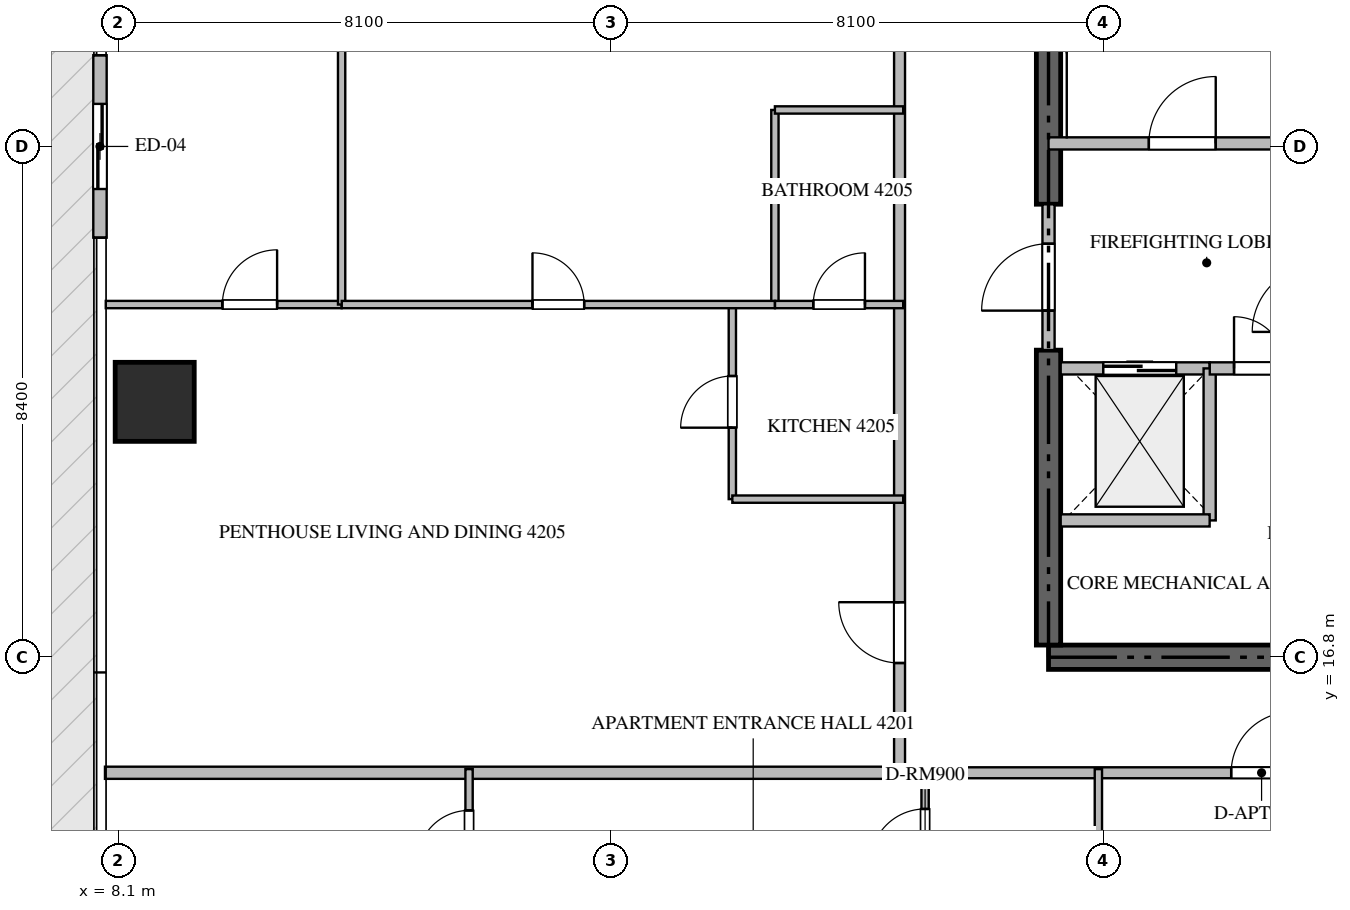
"""IFC4 building model, lengths in metres.
Left out: names, types, materials, properties, quantities, classifications, styles, units other than length and angle.
Written with IfcOpenShell. Run it as: python <this file> out.ifc"""

import sys

from ifc_helpers import new_model, si_unit, direction, frame, frame_2d, origin, origin_2d, place, context, subcontext, project, spatial, rectangle, extrude, source, transform, mapped, element, fill, save


model = new_model("IFC4")
c1 = context("Model", 3, precision=1e-05, world=origin(), true_north=direction((0.0, 1.0)))
c2 = subcontext(c1, "Body", "Model", "MODEL_VIEW")
j1 = project(units=[si_unit("LENGTHUNIT", "METRE"), si_unit("PLANEANGLEUNIT", "RADIAN")], contexts=[c1])
p1 = place(None, origin())
s1 = spatial("IfcSite", under=j1, at=p1, CompositionType="ELEMENT")
p2 = place(p1, origin())
s2 = spatial("IfcBuilding", under=s1, at=p2, CompositionType="ELEMENT")
p3 = place(p2, frame((0.0, 0.0, 168.9)))
s3 = spatial("IfcBuildingStorey", under=s2, at=p3, CompositionType="ELEMENT", Elevation=168.9)
p4 = place(p3, frame((23.4, 16.8, -0.26), z_axis=(0.0, 0.0, 1.0), x_axis=(1.0, 0.0, 0.0)))
e1 = element("IfcWall", 1, at=p4, inside=s3, PredefinedType="SHEAR", context=c2, shape_type="SweptSolid", body=[
    extrude(rectangle(XDim=18.0, YDim=0.4, at=frame_2d((9.0, 0.0))), origin(), (0.0, 0.0, 1.0), 3.748),
])
p5 = place(p3, frame((23.4, 17.0, -0.26), z_axis=(0.0, 0.0, 1.0), x_axis=(0.0, 1.0, 0.0)))
e2 = element("IfcWall", 2, at=p5, inside=s3, PredefinedType="SHEAR", context=c2, shape_type="SweptSolid", body=[
    extrude(rectangle(XDim=4.85, YDim=0.4, at=frame_2d((2.425, 0.0))), origin(), (0.0, 0.0, 1.0), 3.748),
])
p6 = place(p3, frame((23.4, 24.25, -0.26), z_axis=(0.0, 0.0, 1.0), x_axis=(0.0, 1.0, 0.0)))
e3 = element("IfcWall", 3, at=p6, inside=s3, PredefinedType="SHEAR", context=c2, shape_type="SweptSolid", body=[
    extrude(rectangle(XDim=9.15, YDim=0.4, at=frame_2d((4.575, 0.0))), origin(), (0.0, 0.0, 1.0), 3.748),
])
m1 = source(origin(), c2, "Body", "SweptSolid", [
    extrude(rectangle(XDim=1.3, YDim=1.3, at=origin_2d()), origin(), (0.0, 0.0, 1.0), 3.75),
])
p7 = place(p3, frame((8.7, 21.0, -0.26), z_axis=(0.0, 0.0, 1.0), x_axis=(1.0, 0.0, 0.0)))
e4 = element("IfcColumn", 4, at=p7, inside=s3, PredefinedType="COLUMN", context=c2, shape_type="MappedRepresentation", body=[
    mapped(m1, transform((0.0, 0.0, 0.0), scale=1.0)),
])
p8 = place(p3, frame((7.8, 26.7, 0.0), z_axis=(0.0, 0.0, 1.0), x_axis=(0.0, -1.0, 0.0)))
e5 = element("IfcWall", 5, at=p8, inside=s3, PredefinedType="ELEMENTEDWALL", context=c2, shape_type="SweptSolid", body=[
    extrude(rectangle(XDim=3.0, YDim=0.22, at=frame_2d((1.5, 0.0))), origin(), (0.0, 0.0, 1.0), 3.475),
])
p9 = place(p8, frame((0.8, 0.0, 0.0)))
e6 = element("IfcOpeningElement", 6, at=p9, cuts=e5, PredefinedType="OPENING", context=c2, shape_type="SweptSolid", body=[
    extrude(rectangle(XDim=1.4, YDim=2.25, at=frame_2d((0.7, 1.125))), frame((0.0, 0.12, 0.0), z_axis=(0.0, -1.0, 0.0), x_axis=(1.0, 0.0, 0.0)), (0.0, 0.0, 1.0), 0.24),
])
p10 = place(p3, frame((23.4, 25.25, 0.0), z_axis=(0.0, 0.0, 1.0), x_axis=(1.0, 0.0, 0.0)))
e7 = element("IfcWall", 7, at=p10, inside=s3, PredefinedType="STANDARD", context=c2, shape_type="SweptSolid", body=[
    extrude(rectangle(XDim=4.45, YDim=0.2, at=frame_2d((2.225, 0.0))), origin(), (0.0, 0.0, 1.0), 3.49),
])
p11 = place(p10, frame((1.65, 0.0, 0.0)))
e8 = element("IfcOpeningElement", 8, at=p11, cuts=e7, PredefinedType="OPENING", context=c2, shape_type="SweptSolid", body=[
    extrude(rectangle(XDim=1.1, YDim=2.15, at=frame_2d((0.55, 1.075))), frame((0.0, 0.11, 0.0), z_axis=(0.0, -1.0, 0.0), x_axis=(1.0, 0.0, 0.0)), (0.0, 0.0, 1.0), 0.22),
])
p12 = place(p3, frame((23.6, 21.55, 0.0), z_axis=(0.0, 0.0, 1.0), x_axis=(1.0, 0.0, 0.0)))
e9 = element("IfcWall", 9, at=p12, inside=s3, PredefinedType="STANDARD", context=c2, shape_type="SweptSolid", body=[
    extrude(rectangle(XDim=2.45, YDim=0.2, at=frame_2d((1.225, 0.0))), origin(), (0.0, 0.0, 1.0), 3.49),
])
p13 = place(p12, frame((0.7, 0.0, 0.0)))
e10 = element("IfcOpeningElement", 10, at=p13, cuts=e9, PredefinedType="OPENING", context=c2, shape_type="SweptSolid", body=[
    extrude(rectangle(XDim=1.2, YDim=2.2, at=frame_2d((0.6, 1.1))), frame((0.0, 0.11, 0.0), z_axis=(0.0, -1.0, 0.0), x_axis=(1.0, 0.0, 0.0)), (0.0, 0.0, 1.0), 0.22),
])
p14 = place(p3, frame((26.05, 19.05, 0.0), z_axis=(0.0, 0.0, 1.0), x_axis=(0.0, 1.0, 0.0)))
e11 = element("IfcWall", 11, at=p14, inside=s3, PredefinedType="STANDARD", context=c2, shape_type="SweptSolid", body=[
    extrude(rectangle(XDim=2.5, YDim=0.2, at=frame_2d((1.25, 0.0))), origin(), (0.0, 0.0, 1.0), 3.49),
])
p15 = place(p3, frame((23.6, 19.05, 0.0), z_axis=(0.0, 0.0, 1.0), x_axis=(1.0, 0.0, 0.0)))
e12 = element("IfcWall", 12, at=p15, inside=s3, PredefinedType="STANDARD", context=c2, shape_type="SweptSolid", body=[
    extrude(rectangle(XDim=2.45, YDim=0.2, at=frame_2d((1.225, 0.0))), origin(), (0.0, 0.0, 1.0), 3.49),
])
p16 = place(p3, frame((26.052, 21.55, 0.0), z_axis=(0.0, 0.0, 1.0), x_axis=(1.0, 0.0, 0.0)))
e13 = element("IfcWall", 13, at=p16, inside=s3, PredefinedType="STANDARD", context=c2, shape_type="SweptSolid", body=[
    extrude(rectangle(XDim=1.648, YDim=0.2, at=frame_2d((0.824, 0.0))), origin(), (0.0, 0.0, 1.0), 3.49),
])
p17 = place(p16, frame((0.399, 0.0, 0.0)))
e14 = element("IfcOpeningElement", 14, at=p17, cuts=e13, PredefinedType="OPENING", context=c2, shape_type="SweptSolid", body=[
    extrude(rectangle(XDim=0.85, YDim=2.1, at=frame_2d((0.425, 1.05))), frame((0.0, 0.11, 0.0), z_axis=(0.0, -1.0, 0.0), x_axis=(1.0, 0.0, 0.0)), (0.0, 0.0, 1.0), 0.22),
])
p18 = place(p3, frame((23.4, 21.852, 0.0), z_axis=(0.0, 0.0, 1.0), x_axis=(0.0, 1.0, 0.0)))
e15 = element("IfcWall", 15, at=p18, inside=s3, PredefinedType="STANDARD", context=c2, shape_type="SweptSolid", body=[
    extrude(rectangle(XDim=2.396, YDim=0.2, at=frame_2d((1.198, 0.0))), origin(), (0.0, 0.0, 1.0), 3.49),
])
p19 = place(p18, frame((0.648, 0.0, 0.0)))
e16 = element("IfcOpeningElement", 16, at=p19, cuts=e15, PredefinedType="OPENING", context=c2, shape_type="SweptSolid", body=[
    extrude(rectangle(XDim=1.1, YDim=2.15, at=frame_2d((0.55, 1.075))), frame((0.0, 0.11, 0.0), z_axis=(0.0, -1.0, 0.0), x_axis=(1.0, 0.0, 0.0)), (0.0, 0.0, 1.0), 0.22),
])
p20 = place(p3, frame((7.882, 14.9, 0.0), z_axis=(0.0, 0.0, 1.0), x_axis=(1.0, 0.0, 0.0)))
e17 = element("IfcWall", 17, at=p20, inside=s3, PredefinedType="PARTITIONING", context=c2, shape_type="SweptSolid", body=[
    extrude(rectangle(XDim=13.068, YDim=0.2, at=frame_2d((6.534, 0.0))), origin(), (0.0, 0.0, 1.0), 3.49),
])
p21 = place(p3, frame((20.952, 14.9, 0.0), z_axis=(0.0, 0.0, 1.0), x_axis=(1.0, 0.0, 0.0)))
e18 = element("IfcWall", 18, at=p21, inside=s3, PredefinedType="PARTITIONING", context=c2, shape_type="SweptSolid", body=[
    extrude(rectangle(XDim=22.896, YDim=0.18, at=frame_2d((11.448, 0.0))), origin(), (0.0, 0.0, 1.0), 3.49),
])
p22 = place(p21, frame((5.452, 0.0, 0.0)))
e19 = element("IfcOpeningElement", 19, at=p22, cuts=e18, PredefinedType="OPENING", context=c2, shape_type="SweptSolid", body=[
    extrude(rectangle(XDim=1.0, YDim=2.15, at=frame_2d((0.5, 1.075))), frame((0.0, 0.1, 0.0), z_axis=(0.0, -1.0, 0.0), x_axis=(1.0, 0.0, 0.0)), (0.0, 0.0, 1.0), 0.2),
])
p23 = place(p21, frame((19.378, 0.0, 0.0)))
e20 = element("IfcOpeningElement", 20, at=p23, cuts=e18, PredefinedType="OPENING", context=c2, shape_type="SweptSolid", body=[
    extrude(rectangle(XDim=1.0, YDim=2.15, at=frame_2d((0.5, 1.075))), frame((0.0, 0.1, 0.0), z_axis=(0.0, -1.0, 0.0), x_axis=(1.0, 0.0, 0.0)), (0.0, 0.0, 1.0), 0.2),
])
p24 = place(p3, frame((20.95, 14.9, 0.0), z_axis=(0.0, 0.0, 1.0), x_axis=(0.0, 1.0, 0.0)))
e21 = element("IfcWall", 21, at=p24, inside=s3, PredefinedType="PARTITIONING", context=c2, shape_type="SweptSolid", body=[
    extrude(rectangle(XDim=18.7, YDim=0.18, at=frame_2d((9.35, 0.0))), origin(), (0.0, 0.0, 1.0), 3.49),
])
p25 = place(p24, frame((1.805, 0.0, 0.0)))
e22 = element("IfcOpeningElement", 22, at=p25, cuts=e21, PredefinedType="OPENING", context=c2, shape_type="SweptSolid", body=[
    extrude(rectangle(XDim=1.0, YDim=2.15, at=frame_2d((0.5, 1.075))), frame((0.0, 0.1, 0.0), z_axis=(0.0, -1.0, 0.0), x_axis=(1.0, 0.0, 0.0)), (0.0, 0.0, 1.0), 0.2),
])
p26 = place(p3, frame((24.22, 12.15, 0.0), z_axis=(0.0, 0.0, 1.0), x_axis=(0.0, 1.0, 0.0)))
e23 = element("IfcWall", 23, at=p26, inside=s3, PredefinedType="PARTITIONING", context=c2, shape_type="SweptSolid", body=[
    extrude(rectangle(XDim=2.81, YDim=0.12, at=frame_2d((1.405, 0.0))), origin(), (0.0, 0.0, 1.0), 3.49),
])
p27 = place(p3, frame((21.37, 12.75, 0.0), z_axis=(0.0, 0.0, 1.0), x_axis=(0.0, 1.0, 0.0)))
e24 = element("IfcWall", 24, at=p27, inside=s3, PredefinedType="PARTITIONING", context=c2, shape_type="SweptSolid", body=[
    extrude(rectangle(XDim=2.21, YDim=0.12, at=frame_2d((1.105, 0.0))), origin(), (0.0, 0.0, 1.0), 3.49),
])
p28 = place(p27, frame((0.655, 0.0, 0.0)))
e25 = element("IfcOpeningElement", 25, at=p28, cuts=e24, PredefinedType="OPENING", context=c2, shape_type="SweptSolid", body=[
    extrude(rectangle(XDim=0.9, YDim=2.1, at=frame_2d((0.45, 1.05))), frame((0.0, 0.07, 0.0), z_axis=(0.0, -1.0, 0.0), x_axis=(1.0, 0.0, 0.0)), (0.0, 0.0, 1.0), 0.14),
])
p29 = place(p3, frame((13.87, 12.752, 0.0), z_axis=(0.0, 0.0, 1.0), x_axis=(0.0, 1.0, 0.0)))
e26 = element("IfcWall", 26, at=p29, inside=s3, PredefinedType="PARTITIONING", context=c2, shape_type="SweptSolid", body=[
    extrude(rectangle(XDim=2.208, YDim=0.12, at=frame_2d((1.104, 0.0))), origin(), (0.0, 0.0, 1.0), 3.49),
])
p30 = place(p29, frame((0.679, 0.0, 0.0)))
e27 = element("IfcOpeningElement", 27, at=p30, cuts=e26, PredefinedType="OPENING", context=c2, shape_type="SweptSolid", body=[
    extrude(rectangle(XDim=0.85, YDim=2.1, at=frame_2d((0.425, 1.05))), frame((0.0, 0.07, 0.0), z_axis=(0.0, -1.0, 0.0), x_axis=(1.0, 0.0, 0.0)), (0.0, 0.0, 1.0), 0.14),
])
p31 = place(p3, frame((18.2, 19.4, 0.0), z_axis=(0.0, 0.0, 1.0), x_axis=(0.0, 1.0, 0.0)))
e28 = element("IfcWall", 28, at=p31, inside=s3, PredefinedType="PARTITIONING", context=c2, shape_type="SweptSolid", body=[
    extrude(rectangle(XDim=3.2, YDim=0.12, at=frame_2d((1.6, 0.0))), origin(), (0.0, 0.0, 1.0), 3.49),
])
p32 = place(p31, frame((1.175, 0.0, 0.0)))
e29 = element("IfcOpeningElement", 29, at=p32, cuts=e28, PredefinedType="OPENING", context=c2, shape_type="SweptSolid", body=[
    extrude(rectangle(XDim=0.85, YDim=2.1, at=frame_2d((0.425, 1.05))), frame((0.0, 0.07, 0.0), z_axis=(0.0, -1.0, 0.0), x_axis=(1.0, 0.0, 0.0)), (0.0, 0.0, 1.0), 0.14),
])
p33 = place(p3, frame((18.2, 19.4, 0.0), z_axis=(0.0, 0.0, 1.0), x_axis=(1.0, 0.0, 0.0)))
e30 = element("IfcWall", 30, at=p33, inside=s3, PredefinedType="PARTITIONING", context=c2, shape_type="SweptSolid", body=[
    extrude(rectangle(XDim=2.81, YDim=0.12, at=frame_2d((1.405, 0.0))), origin(), (0.0, 0.0, 1.0), 3.49),
])
p34 = place(p3, frame((7.895, 22.6, 0.0), z_axis=(0.0, 0.0, 1.0), x_axis=(1.0, 0.0, 0.0)))
e31 = element("IfcWall", 31, at=p34, inside=s3, PredefinedType="PARTITIONING", context=c2, shape_type="SweptSolid", body=[
    extrude(rectangle(XDim=3.879, YDim=0.12, at=frame_2d((1.939, 0.0))), origin(), (0.0, 0.0, 1.0), 3.49),
])
p35 = place(p34, frame((1.918, 0.0, 0.0)))
e32 = element("IfcOpeningElement", 32, at=p35, cuts=e31, PredefinedType="OPENING", context=c2, shape_type="SweptSolid", body=[
    extrude(rectangle(XDim=0.9, YDim=2.1, at=frame_2d((0.45, 1.05))), frame((0.0, 0.07, 0.0), z_axis=(0.0, -1.0, 0.0), x_axis=(1.0, 0.0, 0.0)), (0.0, 0.0, 1.0), 0.14),
])
p36 = place(p3, frame((11.774, 22.6, 0.0), z_axis=(0.0, 0.0, 1.0), x_axis=(0.0, 1.0, 0.0)))
e33 = element("IfcWall", 33, at=p36, inside=s3, PredefinedType="PARTITIONING", context=c2, shape_type="SweptSolid", body=[
    extrude(rectangle(XDim=11.06, YDim=0.12, at=frame_2d((5.53, 0.0))), origin(), (0.0, 0.0, 1.0), 3.49),
])
p37 = place(p3, frame((18.9, 22.6, 0.0), z_axis=(0.0, 0.0, 1.0), x_axis=(0.0, 1.0, 0.0)))
e34 = element("IfcWall", 34, at=p37, inside=s3, PredefinedType="PARTITIONING", context=c2, shape_type="SweptSolid", body=[
    extrude(rectangle(XDim=3.2, YDim=0.12, at=frame_2d((1.6, 0.0))), origin(), (0.0, 0.0, 1.0), 3.49),
])
p38 = place(p3, frame((18.9, 25.8, 0.0), z_axis=(0.0, 0.0, 1.0), x_axis=(1.0, 0.0, 0.0)))
e35 = element("IfcWall", 35, at=p38, inside=s3, PredefinedType="PARTITIONING", context=c2, shape_type="SweptSolid", body=[
    extrude(rectangle(XDim=2.11, YDim=0.12, at=frame_2d((1.055, 0.0))), origin(), (0.0, 0.0, 1.0), 3.49),
])
p39 = place(p3, frame((11.776, 22.6, 0.0), z_axis=(0.0, 0.0, 1.0), x_axis=(1.0, 0.0, 0.0)))
e36 = element("IfcWall", 36, at=p39, inside=s3, PredefinedType="PARTITIONING", context=c2, shape_type="SweptSolid", body=[
    extrude(rectangle(XDim=7.124, YDim=0.12, at=frame_2d((3.562, 0.0))), origin(), (0.0, 0.0, 1.0), 3.49),
])
p40 = place(p39, frame((3.137, 0.0, 0.0)))
e37 = element("IfcOpeningElement", 37, at=p40, cuts=e36, PredefinedType="OPENING", context=c2, shape_type="SweptSolid", body=[
    extrude(rectangle(XDim=0.85, YDim=2.1, at=frame_2d((0.425, 1.05))), frame((0.0, 0.07, 0.0), z_axis=(0.0, -1.0, 0.0), x_axis=(1.0, 0.0, 0.0)), (0.0, 0.0, 1.0), 0.14),
])
p41 = place(p3, frame((18.902, 22.6, 0.0), z_axis=(0.0, 0.0, 1.0), x_axis=(1.0, 0.0, 0.0)))
e38 = element("IfcWall", 38, at=p41, inside=s3, PredefinedType="PARTITIONING", context=c2, shape_type="SweptSolid", body=[
    extrude(rectangle(XDim=2.108, YDim=0.12, at=frame_2d((1.054, 0.0))), origin(), (0.0, 0.0, 1.0), 3.49),
])
p42 = place(p41, frame((0.629, 0.0, 0.0)))
e39 = element("IfcOpeningElement", 39, at=p42, cuts=e38, PredefinedType="OPENING", context=c2, shape_type="SweptSolid", body=[
    extrude(rectangle(XDim=0.85, YDim=2.1, at=frame_2d((0.425, 1.05))), frame((0.0, 0.07, 0.0), z_axis=(0.0, -1.0, 0.0), x_axis=(1.0, 0.0, 0.0)), (0.0, 0.0, 1.0), 0.14),
])
m2 = source(origin(), c2, "Body", "SweptSolid", [
    extrude(rectangle(XDim=1.4, YDim=2.25, at=frame_2d((0.7, 1.125))), frame((0.0, 0.025, 0.0), z_axis=(0.0, -1.0, 0.0), x_axis=(1.0, 0.0, 0.0)), (0.0, 0.0, 1.0), 0.05),
])
p43 = place(p9, origin())
e40 = element("IfcDoor", 40, at=p43, inside=s3, OperationType="SLIDING_TO_LEFT", PredefinedType="DOOR", context=c2, shape_type="MappedRepresentation", body=[
    mapped(m2, transform((0.0, 0.0, 0.0), scale=1.0)),
])
fill(e6, e40)
m3 = source(origin(), c2, "Body", "SweptSolid", [
    extrude(rectangle(XDim=1.1, YDim=2.15, at=frame_2d((0.55, 1.075))), frame((0.0, 0.025, 0.0), z_axis=(0.0, -1.0, 0.0), x_axis=(1.0, 0.0, 0.0)), (0.0, 0.0, 1.0), 0.05),
])
p44 = place(p11, origin())
e41 = element("IfcDoor", 41, at=p44, inside=s3, OperationType="SINGLE_SWING_RIGHT", PredefinedType="DOOR", context=c2, shape_type="MappedRepresentation", body=[
    mapped(m3, transform((0.0, 0.0, 0.0), scale=1.0)),
])
fill(e8, e41)
m4 = source(origin(), c2, "Body", "SweptSolid", [
    extrude(rectangle(XDim=1.2, YDim=2.2, at=frame_2d((0.6, 1.1))), frame((0.0, 0.025, 0.0), z_axis=(0.0, -1.0, 0.0), x_axis=(1.0, 0.0, 0.0)), (0.0, 0.0, 1.0), 0.05),
])
p45 = place(p13, origin())
e42 = element("IfcDoor", 42, at=p45, inside=s3, OperationType="DOUBLE_DOOR_SLIDING", PredefinedType="DOOR", context=c2, shape_type="MappedRepresentation", body=[
    mapped(m4, transform((0.0, 0.0, 0.0), scale=1.0)),
])
fill(e10, e42)
m5 = source(origin(), c2, "Body", "SweptSolid", [
    extrude(rectangle(XDim=0.85, YDim=2.1, at=frame_2d((0.425, 1.05))), frame((0.0, 0.025, 0.0), z_axis=(0.0, -1.0, 0.0), x_axis=(1.0, 0.0, 0.0)), (0.0, 0.0, 1.0), 0.05),
])
p46 = place(p17, origin())
e43 = element("IfcDoor", 43, at=p46, inside=s3, OperationType="SINGLE_SWING_LEFT", PredefinedType="DOOR", context=c2, shape_type="MappedRepresentation", body=[
    mapped(m5, transform((0.0, 0.0, 0.0), scale=1.0)),
])
fill(e14, e43)
p47 = place(p19, origin())
e44 = element("IfcDoor", 44, at=p47, inside=s3, OperationType="SINGLE_SWING_LEFT", PredefinedType="DOOR", context=c2, shape_type="MappedRepresentation", body=[
    mapped(m3, transform((0.0, 0.0, 0.0), scale=1.0)),
])
fill(e16, e44)
m6 = source(origin(), c2, "Body", "SweptSolid", [
    extrude(rectangle(XDim=1.0, YDim=2.15, at=frame_2d((0.5, 1.075))), frame((0.0, 0.025, 0.0), z_axis=(0.0, -1.0, 0.0), x_axis=(1.0, 0.0, 0.0)), (0.0, 0.0, 1.0), 0.05),
])
p48 = place(p22, origin())
e45 = element("IfcDoor", 45, at=p48, inside=s3, OperationType="SINGLE_SWING_RIGHT", PredefinedType="DOOR", context=c2, shape_type="MappedRepresentation", body=[
    mapped(m6, transform((0.0, 0.0, 0.0), scale=1.0)),
])
fill(e19, e45)
p49 = place(p25, origin())
e46 = element("IfcDoor", 46, at=p49, inside=s3, OperationType="SINGLE_SWING_RIGHT", PredefinedType="DOOR", context=c2, shape_type="MappedRepresentation", body=[
    mapped(m6, transform((0.0, 0.0, 0.0), scale=1.0)),
])
fill(e22, e46)
m7 = source(origin(), c2, "Body", "SweptSolid", [
    extrude(rectangle(XDim=0.9, YDim=2.1, at=frame_2d((0.45, 1.05))), frame((0.0, 0.025, 0.0), z_axis=(0.0, -1.0, 0.0), x_axis=(1.0, 0.0, 0.0)), (0.0, 0.0, 1.0), 0.05),
])
p50 = place(p28, origin())
e47 = element("IfcDoor", 47, at=p50, inside=s3, OperationType="SINGLE_SWING_LEFT", PredefinedType="DOOR", context=c2, shape_type="MappedRepresentation", body=[
    mapped(m7, transform((0.0, 0.0, 0.0), scale=1.0)),
])
fill(e25, e47)
p51 = place(p30, origin())
e48 = element("IfcDoor", 48, at=p51, inside=s3, OperationType="SINGLE_SWING_LEFT", PredefinedType="DOOR", context=c2, shape_type="MappedRepresentation", body=[
    mapped(m5, transform((0.0, 0.0, 0.0), scale=1.0)),
])
fill(e27, e48)
p52 = place(p32, origin())
e49 = element("IfcDoor", 49, at=p52, inside=s3, OperationType="SINGLE_SWING_LEFT", PredefinedType="DOOR", context=c2, shape_type="MappedRepresentation", body=[
    mapped(m5, transform((0.0, 0.0, 0.0), scale=1.0)),
])
fill(e29, e49)
p53 = place(p35, origin())
e50 = element("IfcDoor", 50, at=p53, inside=s3, OperationType="SINGLE_SWING_RIGHT", PredefinedType="DOOR", context=c2, shape_type="MappedRepresentation", body=[
    mapped(m7, transform((0.0, 0.0, 0.0), scale=1.0)),
])
fill(e32, e50)
p54 = place(p40, origin())
e51 = element("IfcDoor", 51, at=p54, inside=s3, OperationType="SINGLE_SWING_LEFT", PredefinedType="DOOR", context=c2, shape_type="MappedRepresentation", body=[
    mapped(m5, transform((0.0, 0.0, 0.0), scale=1.0)),
])
fill(e37, e51)
p55 = place(p42, origin())
e52 = element("IfcDoor", 52, at=p55, inside=s3, OperationType="SINGLE_SWING_RIGHT", PredefinedType="DOOR", context=c2, shape_type="MappedRepresentation", body=[
    mapped(m5, transform((0.0, 0.0, 0.0), scale=1.0)),
])
fill(e39, e52)
save(model, sys.argv[1])
